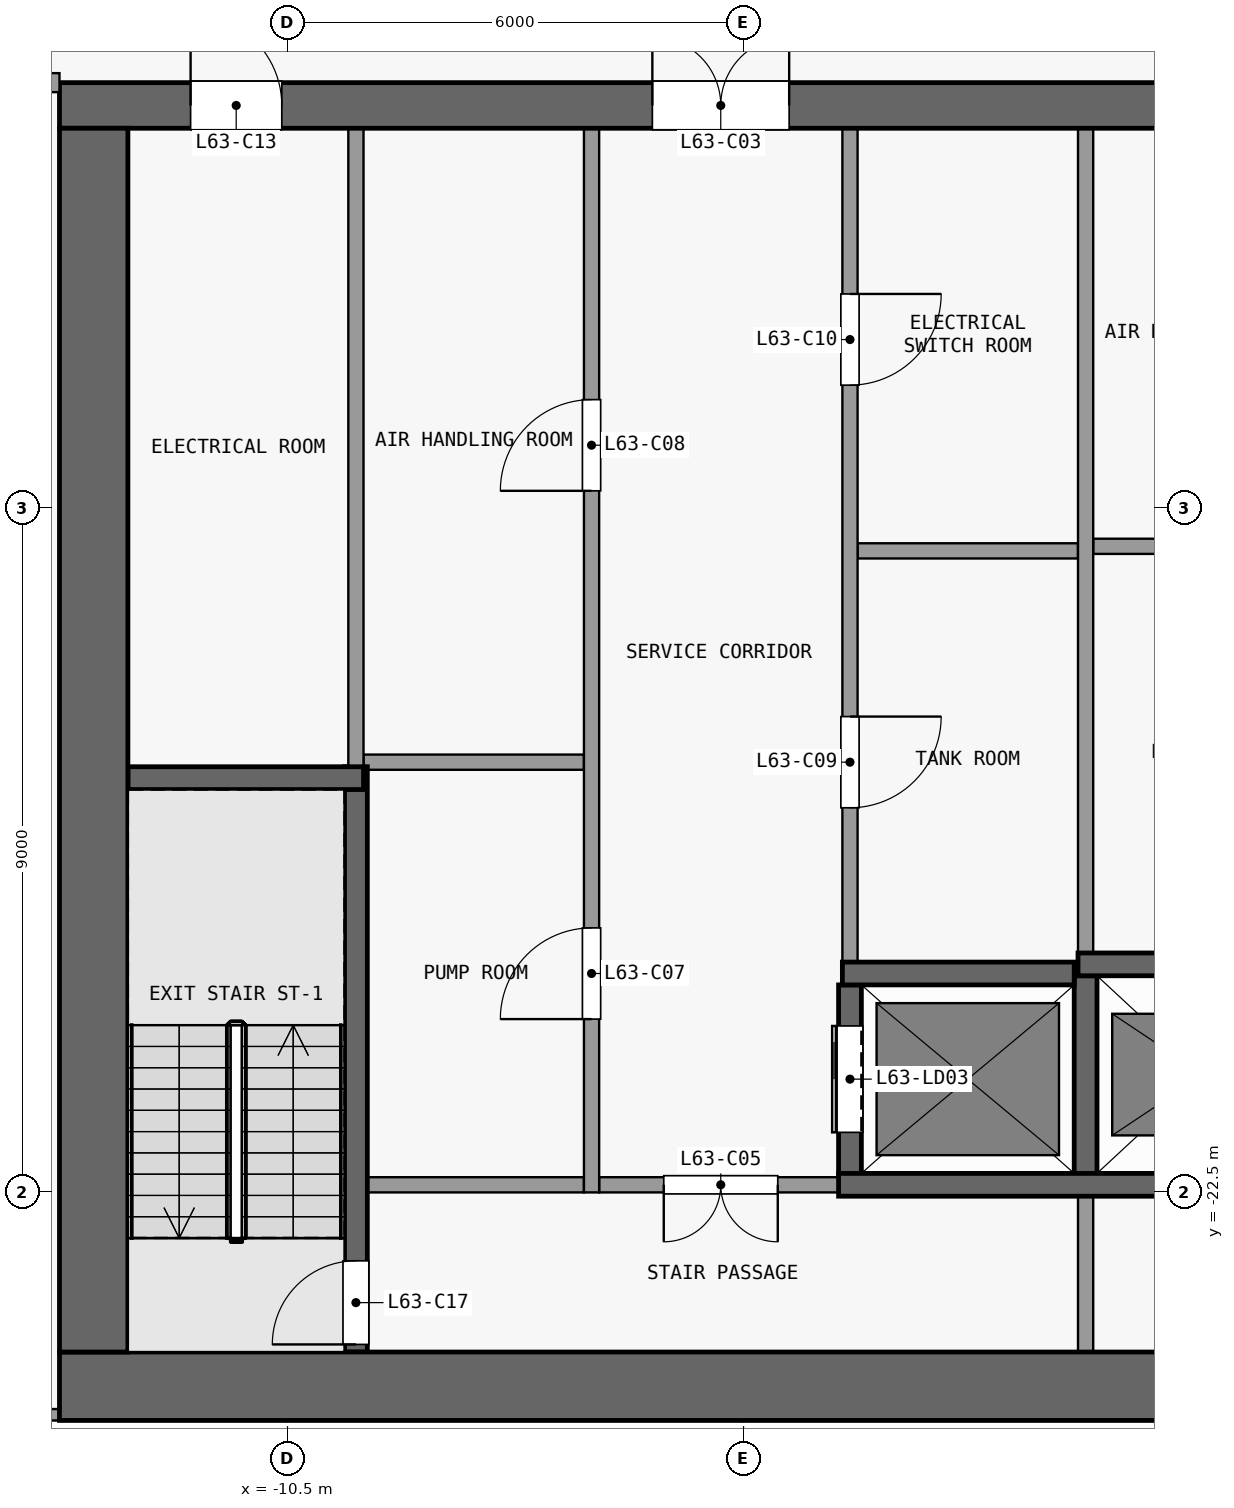
"""IFC4 building model, lengths in metres.
Left out: names, types, materials, properties, quantities, classifications, styles, units other than length and angle.
Written with IfcOpenShell. Run it as: python <this file> out.ifc"""

import sys

from ifc_helpers import new_model, si_unit, direction, frame, frame_2d, origin, place, context, subcontext, project, spatial, rectangle, extrude, element, fill, save


model = new_model("IFC4")
c1 = context("Model", 3, precision=1e-05, world=origin(), true_north=direction((0.0, 1.0)))
c2 = subcontext(c1, "Body", "Model", "MODEL_VIEW")
j1 = project(units=[si_unit("LENGTHUNIT", "METRE"), si_unit("PLANEANGLEUNIT", "RADIAN")], contexts=[c1])
p1 = place(None, origin())
s1 = spatial("IfcSite", under=j1, at=p1, CompositionType="ELEMENT")
p2 = place(p1, origin())
s2 = spatial("IfcBuilding", under=s1, at=p2, CompositionType="ELEMENT")
p3 = place(p2, frame((0.0, 0.0, 248.3)))
s3 = spatial("IfcBuildingStorey", under=s2, at=p3, CompositionType="ELEMENT", Elevation=248.3)
p4 = place(p3, frame((-13.5, -25.05, 0.0), z_axis=(0.0, 0.0, 1.0), x_axis=(1.0, 0.0, 0.0)))
e1 = element("IfcWall", 1, at=p4, inside=s3, PredefinedType="SHEAR", context=c2, shape_type="SweptSolid", body=[
    extrude(rectangle(XDim=27.0, YDim=0.9, at=frame_2d((13.5, 0.0))), origin(), (0.0, 0.0, 1.0), 6.9),
])
p5 = place(p3, frame((-13.5, -8.2, 0.0), z_axis=(0.0, 0.0, 1.0), x_axis=(1.0, 0.0, 0.0)))
e2 = element("IfcWall", 2, at=p5, inside=s3, PredefinedType="SHEAR", context=c2, shape_type="SweptSolid", body=[
    extrude(rectangle(XDim=27.0, YDim=0.6, at=frame_2d((13.5, 0.0))), origin(), (0.0, 0.0, 1.0), 6.9),
])
p6 = place(p5, frame((7.8, 0.0, 0.0)))
e3 = element("IfcOpeningElement", 3, at=p6, cuts=e2, PredefinedType="OPENING", context=c2, shape_type="SweptSolid", body=[
    extrude(rectangle(XDim=1.8, YDim=2.1, at=frame_2d((0.9, 1.05))), frame((0.0, 0.31, 0.0), z_axis=(0.0, -1.0, 0.0), x_axis=(1.0, 0.0, 0.0)), (0.0, 0.0, 1.0), 0.62),
])
p7 = place(p5, frame((17.4, 0.0, 0.0)))
e4 = element("IfcOpeningElement", 4, at=p7, cuts=e2, PredefinedType="OPENING", context=c2, shape_type="SweptSolid", body=[
    extrude(rectangle(XDim=1.8, YDim=2.1, at=frame_2d((0.9, 1.05))), frame((0.0, 0.31, 0.0), z_axis=(0.0, -1.0, 0.0), x_axis=(1.0, 0.0, 0.0)), (0.0, 0.0, 1.0), 0.62),
])
p8 = place(p5, frame((1.725, 0.0, 0.0)))
e5 = element("IfcOpeningElement", 5, at=p8, cuts=e2, PredefinedType="OPENING", context=c2, shape_type="SweptSolid", body=[
    extrude(rectangle(XDim=1.2, YDim=2.1, at=frame_2d((0.6, 1.05))), frame((0.0, 0.31, 0.0), z_axis=(0.0, -1.0, 0.0), x_axis=(1.0, 0.0, 0.0)), (0.0, 0.0, 1.0), 0.62),
])
p9 = place(p5, frame((23.375, 0.0, 0.0)))
e6 = element("IfcOpeningElement", 6, at=p9, cuts=e2, PredefinedType="OPENING", context=c2, shape_type="SweptSolid", body=[
    extrude(rectangle(XDim=0.9, YDim=2.1, at=frame_2d((0.45, 1.05))), frame((0.0, 0.31, 0.0), z_axis=(0.0, -1.0, 0.0), x_axis=(1.0, 0.0, 0.0)), (0.0, 0.0, 1.0), 0.62),
])
p10 = place(p3, frame((-13.05, -24.6, 0.0), z_axis=(0.0, 0.0, 1.0), x_axis=(0.0, 1.0, 0.0)))
e7 = element("IfcWall", 7, at=p10, inside=s3, PredefinedType="SHEAR", context=c2, shape_type="SweptSolid", body=[
    extrude(rectangle(XDim=16.1, YDim=0.9, at=frame_2d((8.05, 0.0))), origin(), (0.0, 0.0, 1.0), 6.9),
])
p11 = place(p3, frame((-9.45, -22.4, 0.0), z_axis=(0.0, 0.0, 1.0), x_axis=(1.0, 0.0, 0.0)))
e8 = element("IfcWall", 8, at=p11, inside=s3, PredefinedType="PARTITIONING", context=c2, shape_type="SweptSolid", body=[
    extrude(rectangle(XDim=2.85, YDim=0.2, at=frame_2d((1.425, 0.0))), origin(), (0.0, 0.0, 1.0), 6.9),
])
p12 = place(p3, frame((-3.25, -22.4, 0.0), z_axis=(0.0, 0.0, 1.0), x_axis=(-1.0, 0.0, 0.0)))
e9 = element("IfcWall", 9, at=p12, inside=s3, PredefinedType="PARTITIONING", context=c2, shape_type="SweptSolid", body=[
    extrude(rectangle(XDim=3.15, YDim=0.2, at=frame_2d((1.575, 0.0))), origin(), (0.0, 0.0, 1.0), 6.9),
])
p13 = place(p12, frame((0.8, 0.0, 0.0)))
e10 = element("IfcOpeningElement", 10, at=p13, cuts=e9, PredefinedType="OPENING", context=c2, shape_type="SweptSolid", body=[
    extrude(rectangle(XDim=1.5, YDim=2.1, at=frame_2d((0.75, 1.05))), frame((0.0, 0.11, 0.0), z_axis=(0.0, -1.0, 0.0), x_axis=(1.0, 0.0, 0.0)), (0.0, 0.0, 1.0), 0.22),
])
p14 = place(p3, frame((-3.25, -22.4, 0.0), z_axis=(0.0, 0.0, 1.0), x_axis=(1.0, 0.0, 0.0)))
e11 = element("IfcWall", 11, at=p14, inside=s3, PredefinedType="SHEAR", context=c2, shape_type="SweptSolid", body=[
    extrude(rectangle(XDim=6.5, YDim=0.3, at=frame_2d((3.25, 0.0))), origin(), (0.0, 0.0, 1.0), 6.9),
])
p15 = place(p3, frame((-3.2, -19.62, 0.0), z_axis=(0.0, 0.0, 1.0), x_axis=(1.0, 0.0, 0.0)))
e12 = element("IfcWall", 12, at=p15, inside=s3, PredefinedType="SHEAR", context=c2, shape_type="SweptSolid", body=[
    extrude(rectangle(XDim=3.05, YDim=0.3, at=frame_2d((1.525, 0.0))), origin(), (0.0, 0.0, 1.0), 6.9),
])
p16 = place(p3, frame((-0.1, -19.5, 0.0), z_axis=(0.0, 0.0, 1.0), x_axis=(1.0, 0.0, 0.0)))
e13 = element("IfcWall", 13, at=p16, inside=s3, PredefinedType="SHEAR", context=c2, shape_type="SweptSolid", body=[
    extrude(rectangle(XDim=3.3, YDim=0.3, at=frame_2d((1.65, 0.0))), origin(), (0.0, 0.0, 1.0), 6.9),
])
p17 = place(p3, frame((-12.6, -17.05, 0.0), z_axis=(0.0, 0.0, 1.0), x_axis=(1.0, 0.0, 0.0)))
e14 = element("IfcWall", 14, at=p17, inside=s3, PredefinedType="SHEAR", context=c2, shape_type="SweptSolid", body=[
    extrude(rectangle(XDim=3.1, YDim=0.3, at=frame_2d((1.55, 0.0))), origin(), (0.0, 0.0, 1.0), 6.9),
])
for number, where, z_axis, x_axis in (
    (15, (-9.5, -16.84, 0.0), (0.0, 0.0, 1.0), (1.0, 0.0, 0.0)),
    (16, (-3.0, -14.06, 0.0), (0.0, 0.0, 1.0), (1.0, 0.0, 0.0)),
    (17, (0.1, -14.0, 0.0), (0.0, 0.0, 1.0), (1.0, 0.0, 0.0)),
):
    element("IfcWall", number, at=place(p3, frame(where, z_axis=z_axis, x_axis=x_axis)), inside=s3, PredefinedType="PARTITIONING", context=c2, shape_type="SweptSolid", body=[
        extrude(rectangle(XDim=2.9, YDim=0.2, at=frame_2d((1.45, 0.0))), origin(), (0.0, 0.0, 1.0), 6.9),
    ])
p18 = place(p3, frame((-9.6, -24.6, 0.0), z_axis=(0.0, 0.0, 1.0), x_axis=(0.0, 1.0, 0.0)))
e18 = element("IfcWall", 18, at=p18, inside=s3, PredefinedType="SHEAR", context=c2, shape_type="SweptSolid", body=[
    extrude(rectangle(XDim=7.7, YDim=0.3, at=frame_2d((3.85, 0.0))), origin(), (0.0, 0.0, 1.0), 6.9),
])
p19 = place(p18, frame((0.1, 0.0, 0.0)))
e19 = element("IfcOpeningElement", 19, at=p19, cuts=e18, PredefinedType="OPENING", context=c2, shape_type="SweptSolid", body=[
    extrude(rectangle(XDim=1.1, YDim=2.1, at=frame_2d((0.55, 1.05))), frame((0.0, 0.16, 0.0), z_axis=(0.0, -1.0, 0.0), x_axis=(1.0, 0.0, 0.0)), (0.0, 0.0, 1.0), 0.32),
])
p20 = place(p3, frame((-9.6, -16.9, 0.0), z_axis=(0.0, 0.0, 1.0), x_axis=(0.0, 1.0, 0.0)))
e20 = element("IfcWall", 20, at=p20, inside=s3, PredefinedType="PARTITIONING", context=c2, shape_type="SweptSolid", body=[
    extrude(rectangle(XDim=8.4, YDim=0.2, at=frame_2d((4.2, 0.0))), origin(), (0.0, 0.0, 1.0), 6.9),
])
p21 = place(p3, frame((-6.5, -22.5, 0.0), z_axis=(0.0, 0.0, 1.0), x_axis=(0.0, 1.0, 0.0)))
e21 = element("IfcWall", 21, at=p21, inside=s3, PredefinedType="PARTITIONING", context=c2, shape_type="SweptSolid", body=[
    extrude(rectangle(XDim=14.0, YDim=0.2, at=frame_2d((7.0, 0.0))), origin(), (0.0, 0.0, 1.0), 6.9),
])
p22 = place(p21, frame((2.28, 0.0, 0.0)))
e22 = element("IfcOpeningElement", 22, at=p22, cuts=e21, PredefinedType="OPENING", context=c2, shape_type="SweptSolid", body=[
    extrude(rectangle(XDim=1.2, YDim=2.1, at=frame_2d((0.6, 1.05))), frame((0.0, 0.11, 0.0), z_axis=(0.0, -1.0, 0.0), x_axis=(1.0, 0.0, 0.0)), (0.0, 0.0, 1.0), 0.22),
])
p23 = place(p21, frame((9.23, 0.0, 0.0)))
e23 = element("IfcOpeningElement", 23, at=p23, cuts=e21, PredefinedType="OPENING", context=c2, shape_type="SweptSolid", body=[
    extrude(rectangle(XDim=1.2, YDim=2.1, at=frame_2d((0.6, 1.05))), frame((0.0, 0.11, 0.0), z_axis=(0.0, -1.0, 0.0), x_axis=(1.0, 0.0, 0.0)), (0.0, 0.0, 1.0), 0.22),
])
p24 = place(p3, frame((-3.1, -22.25, 0.0), z_axis=(0.0, 0.0, 1.0), x_axis=(0.0, 1.0, 0.0)))
e24 = element("IfcWall", 24, at=p24, inside=s3, PredefinedType="SHEAR", context=c2, shape_type="SweptSolid", body=[
    extrude(rectangle(XDim=2.48, YDim=0.3, at=frame_2d((1.24, 0.0))), origin(), (0.0, 0.0, 1.0), 6.9),
])
p25 = place(p24, frame((0.54, 0.0, 0.0)))
e25 = element("IfcOpeningElement", 25, at=p25, cuts=e24, PredefinedType="OPENING", context=c2, shape_type="SweptSolid", body=[
    extrude(rectangle(XDim=1.4, YDim=2.1, at=frame_2d((0.7, 1.05))), frame((0.0, 0.16, 0.0), z_axis=(0.0, -1.0, 0.0), x_axis=(1.0, 0.0, 0.0)), (0.0, 0.0, 1.0), 0.32),
])
p26 = place(p3, frame((-3.1, -8.5, 0.0), z_axis=(0.0, 0.0, 1.0), x_axis=(0.0, -1.0, 0.0)))
e26 = element("IfcWall", 26, at=p26, inside=s3, PredefinedType="PARTITIONING", context=c2, shape_type="SweptSolid", body=[
    extrude(rectangle(XDim=10.97, YDim=0.2, at=frame_2d((5.485, 0.0))), origin(), (0.0, 0.0, 1.0), 6.9),
])
p27 = place(p26, frame((7.74, 0.0, 0.0)))
e27 = element("IfcOpeningElement", 27, at=p27, cuts=e26, PredefinedType="OPENING", context=c2, shape_type="SweptSolid", body=[
    extrude(rectangle(XDim=1.2, YDim=2.1, at=frame_2d((0.6, 1.05))), frame((0.0, 0.11, 0.0), z_axis=(0.0, -1.0, 0.0), x_axis=(1.0, 0.0, 0.0)), (0.0, 0.0, 1.0), 0.22),
])
p28 = place(p26, frame((2.18, 0.0, 0.0)))
e28 = element("IfcOpeningElement", 28, at=p28, cuts=e26, PredefinedType="OPENING", context=c2, shape_type="SweptSolid", body=[
    extrude(rectangle(XDim=1.2, YDim=2.1, at=frame_2d((0.6, 1.05))), frame((0.0, 0.11, 0.0), z_axis=(0.0, -1.0, 0.0), x_axis=(1.0, 0.0, 0.0)), (0.0, 0.0, 1.0), 0.22),
])
p29 = place(p3, frame((0.0, -24.6, 0.0), z_axis=(0.0, 0.0, 1.0), x_axis=(0.0, 1.0, 0.0)))
e29 = element("IfcWall", 29, at=p29, inside=s3, PredefinedType="PARTITIONING", context=c2, shape_type="SweptSolid", body=[
    extrude(rectangle(XDim=2.05, YDim=0.2, at=frame_2d((1.025, 0.0))), origin(), (0.0, 0.0, 1.0), 6.9),
])
p30 = place(p3, frame((0.0, -22.25, 0.0), z_axis=(0.0, 0.0, 1.0), x_axis=(0.0, 1.0, 0.0)))
e30 = element("IfcWall", 30, at=p30, inside=s3, PredefinedType="SHEAR", context=c2, shape_type="SweptSolid", body=[
    extrude(rectangle(XDim=2.6, YDim=0.3, at=frame_2d((1.3, 0.0))), origin(), (0.0, 0.0, 1.0), 6.9),
])
p31 = place(p3, frame((0.0, -19.35, 0.0), z_axis=(0.0, 0.0, 1.0), x_axis=(0.0, 1.0, 0.0)))
e31 = element("IfcWall", 31, at=p31, inside=s3, PredefinedType="PARTITIONING", context=c2, shape_type="SweptSolid", body=[
    extrude(rectangle(XDim=10.85, YDim=0.2, at=frame_2d((5.425, 0.0))), origin(), (0.0, 0.0, 1.0), 6.9),
])
p32 = place(p3, frame((-13.5, -25.425, 0.0), z_axis=(0.0, 0.0, 1.0), x_axis=(-1.0, 0.0, 0.0)))
e32 = element("IfcWall", 32, at=p32, inside=s3, PredefinedType="SOLIDWALL", context=c2, shape_type="SweptSolid", body=[
    extrude(rectangle(XDim=1.5, YDim=0.15, at=frame_2d((0.75, 0.0))), origin(), (0.0, 0.0, 1.0), 6.9),
])
p33 = place(p3, frame((-19.35, -7.9, 0.0), z_axis=(0.0, 0.0, 1.0), x_axis=(1.0, 0.0, 0.0)))
e33 = element("IfcWall", 33, at=p33, inside=s3, PredefinedType="PARTITIONING", context=c2, shape_type="SweptSolid", body=[
    extrude(rectangle(XDim=5.85, YDim=0.25, at=frame_2d((2.925, 0.0))), origin(), (0.0, 0.0, 1.0), 6.9),
])
p34 = place(p33, frame((3.6, 0.0, 0.0)))
e34 = element("IfcOpeningElement", 34, at=p34, cuts=e33, PredefinedType="OPENING", context=c2, shape_type="SweptSolid", body=[
    extrude(rectangle(XDim=1.2, YDim=2.1, at=frame_2d((0.6, 1.05))), frame((0.0, 0.135, 0.0), z_axis=(0.0, -1.0, 0.0), x_axis=(1.0, 0.0, 0.0)), (0.0, 0.0, 1.0), 0.27),
])
p35 = place(p25, origin())
e35 = element("IfcDoor", 35, at=p35, inside=s3, OperationType="DOUBLE_DOOR_SLIDING", PredefinedType="DOOR", context=c2, shape_type="SweptSolid", body=[
    extrude(rectangle(XDim=1.4, YDim=2.1, at=frame_2d((0.7, 1.05))), frame((0.0, 0.025, 0.0), z_axis=(0.0, -1.0, 0.0), x_axis=(1.0, 0.0, 0.0)), (0.0, 0.0, 1.0), 0.05),
])
fill(e25, e35)
p36 = place(p6, origin())
e36 = element("IfcDoor", 36, at=p36, inside=s3, OperationType="DOUBLE_DOOR_SINGLE_SWING", PredefinedType="DOOR", context=c2, shape_type="SweptSolid", body=[
    extrude(rectangle(XDim=1.8, YDim=2.1, at=frame_2d((0.9, 1.05))), frame((0.0, 0.025, 0.0), z_axis=(0.0, -1.0, 0.0), x_axis=(1.0, 0.0, 0.0)), (0.0, 0.0, 1.0), 0.05),
])
fill(e3, e36)
p37 = place(p13, origin())
e37 = element("IfcDoor", 37, at=p37, inside=s3, OperationType="DOUBLE_DOOR_SINGLE_SWING", PredefinedType="DOOR", context=c2, shape_type="SweptSolid", body=[
    extrude(rectangle(XDim=1.5, YDim=2.1, at=frame_2d((0.75, 1.05))), frame((0.0, 0.025, 0.0), z_axis=(0.0, -1.0, 0.0), x_axis=(1.0, 0.0, 0.0)), (0.0, 0.0, 1.0), 0.05),
])
fill(e10, e37)
p38 = place(p22, origin())
e38 = element("IfcDoor", 38, at=p38, inside=s3, OperationType="SINGLE_SWING_LEFT", PredefinedType="DOOR", context=c2, shape_type="SweptSolid", body=[
    extrude(rectangle(XDim=1.2, YDim=2.1, at=frame_2d((0.6, 1.05))), frame((0.0, 0.025, 0.0), z_axis=(0.0, -1.0, 0.0), x_axis=(1.0, 0.0, 0.0)), (0.0, 0.0, 1.0), 0.05),
])
fill(e22, e38)
p39 = place(p23, origin())
e39 = element("IfcDoor", 39, at=p39, inside=s3, OperationType="SINGLE_SWING_LEFT", PredefinedType="DOOR", context=c2, shape_type="SweptSolid", body=[
    extrude(rectangle(XDim=1.2, YDim=2.1, at=frame_2d((0.6, 1.05))), frame((0.0, 0.025, 0.0), z_axis=(0.0, -1.0, 0.0), x_axis=(1.0, 0.0, 0.0)), (0.0, 0.0, 1.0), 0.05),
])
fill(e23, e39)
p40 = place(p27, origin())
e40 = element("IfcDoor", 40, at=p40, inside=s3, OperationType="SINGLE_SWING_LEFT", PredefinedType="DOOR", context=c2, shape_type="SweptSolid", body=[
    extrude(rectangle(XDim=1.2, YDim=2.1, at=frame_2d((0.6, 1.05))), frame((0.0, 0.025, 0.0), z_axis=(0.0, -1.0, 0.0), x_axis=(1.0, 0.0, 0.0)), (0.0, 0.0, 1.0), 0.05),
])
fill(e27, e40)
p41 = place(p28, origin())
e41 = element("IfcDoor", 41, at=p41, inside=s3, OperationType="SINGLE_SWING_LEFT", PredefinedType="DOOR", context=c2, shape_type="SweptSolid", body=[
    extrude(rectangle(XDim=1.2, YDim=2.1, at=frame_2d((0.6, 1.05))), frame((0.0, 0.025, 0.0), z_axis=(0.0, -1.0, 0.0), x_axis=(1.0, 0.0, 0.0)), (0.0, 0.0, 1.0), 0.05),
])
fill(e28, e41)
p42 = place(p8, origin())
e42 = element("IfcDoor", 42, at=p42, inside=s3, OperationType="SINGLE_SWING_LEFT", PredefinedType="DOOR", context=c2, shape_type="SweptSolid", body=[
    extrude(rectangle(XDim=1.2, YDim=2.1, at=frame_2d((0.6, 1.05))), frame((0.0, 0.025, 0.0), z_axis=(0.0, -1.0, 0.0), x_axis=(1.0, 0.0, 0.0)), (0.0, 0.0, 1.0), 0.05),
])
fill(e5, e42)
p43 = place(p19, origin())
e43 = element("IfcDoor", 43, at=p43, inside=s3, OperationType="SINGLE_SWING_LEFT", PredefinedType="DOOR", context=c2, shape_type="SweptSolid", body=[
    extrude(rectangle(XDim=1.1, YDim=2.1, at=frame_2d((0.55, 1.05))), frame((0.0, 0.025, 0.0), z_axis=(0.0, -1.0, 0.0), x_axis=(1.0, 0.0, 0.0)), (0.0, 0.0, 1.0), 0.05),
])
fill(e19, e43)
save(model, sys.argv[1])
